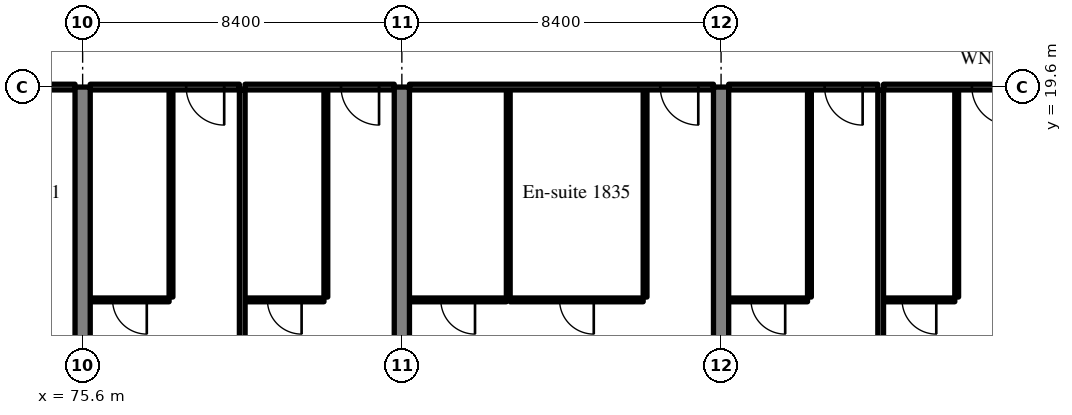
"""IFC4 building model, lengths in metres.
Left out: names, types, materials, properties, quantities, classifications, styles, units other than length and angle.
Written with IfcOpenShell. Run it as: python <this file> out.ifc"""

import sys

from ifc_helpers import new_model, si_unit, direction, frame, frame_2d, origin, place, context, subcontext, project, spatial, rectangle, extrude, source, transform, mapped, element, fill, save


model = new_model("IFC4")
c1 = context("Model", 3, precision=1e-05, world=origin(), true_north=direction((0.0, 1.0)))
c2 = subcontext(c1, "Body", "Model", "MODEL_VIEW")
j1 = project(units=[si_unit("LENGTHUNIT", "METRE"), si_unit("PLANEANGLEUNIT", "RADIAN")], contexts=[c1])
p1 = place(None, origin())
s1 = spatial("IfcSite", under=j1, at=p1, CompositionType="ELEMENT")
p2 = place(p1, origin())
s2 = spatial("IfcBuilding", under=s1, at=p2, CompositionType="ELEMENT")
p3 = place(p2, frame((0.0, 0.0, 77.2)))
s3 = spatial("IfcBuildingStorey", under=s2, at=p3, CompositionType="ELEMENT", Elevation=77.2)
m1 = source(origin(), c2, "Body", "SweptSolid", [
    extrude(rectangle(XDim=19.6, YDim=0.4, at=frame_2d((9.8, 0.0))), origin(), (0.0, 0.0, 1.0), 3.52),
])
for number, where, z_axis, x_axis in (
    (1, (75.6, 0.0, 0.0), (0.0, 0.0, 1.0), (0.0, 1.0, 0.0)),
    (2, (84.0, 0.0, 0.0), (0.0, 0.0, 1.0), (0.0, 1.0, 0.0)),
    (3, (92.4, 0.0, 0.0), (0.0, 0.0, 1.0), (0.0, 1.0, 0.0)),
):
    element("IfcWall", number, at=place(p3, frame(where, z_axis=z_axis, x_axis=x_axis)), inside=s3, PredefinedType="SHEAR", context=c2, shape_type="MappedRepresentation", body=[
        mapped(m1, transform((0.0, 0.0, 0.0), scale=1.0)),
    ])
m2 = source(origin(), c2, "Body", "SweptSolid", [
    extrude(rectangle(XDim=8.0, YDim=0.15, at=frame_2d((4.0, 0.0))), origin(), (0.0, 0.0, 1.0), 2.82),
])
p4 = place(p3, frame((67.4, 19.6, 0.0), z_axis=(0.0, 0.0, 1.0), x_axis=(1.0, 0.0, 0.0)))
e4 = element("IfcWall", 4, at=p4, inside=s3, PredefinedType="PARTITIONING", context=c2, shape_type="MappedRepresentation", body=[
    mapped(m2, transform((0.0, 0.0, 0.0), scale=1.0)),
])
m3 = source(origin(), c2, "Body", "SweptSolid", [
    extrude(rectangle(XDim=1.8, YDim=2.1, at=frame_2d((0.9, 1.05))), frame((0.0, 0.085, 0.0), z_axis=(0.0, -1.0, 0.0), x_axis=(1.0, 0.0, 0.0)), (0.0, 0.0, 1.0), 0.17),
])
p5 = place(p4, frame((3.1, 0.0, 0.0)))
e5 = element("IfcOpeningElement", 5, at=p5, cuts=e4, PredefinedType="OPENING", context=c2, shape_type="MappedRepresentation", body=[
    mapped(m3, transform((0.0, 0.0, 0.0), scale=1.0)),
])
m4 = source(origin(), c2, "Body", "SweptSolid", [
    extrude(rectangle(XDim=5.45, YDim=0.1, at=frame_2d((2.725, 0.0))), origin(), (0.0, 0.0, 1.0), 3.52),
])
p6 = place(p3, frame((77.925, 14.075, 0.0), z_axis=(0.0, 0.0, 1.0), x_axis=(0.0, 1.0, 0.0)))
e6 = element("IfcWall", 6, at=p6, inside=s3, PredefinedType="PARTITIONING", context=c2, shape_type="MappedRepresentation", body=[
    mapped(m4, transform((0.0, 0.0, 0.0), scale=1.0)),
])
m5 = source(origin(), c2, "Body", "SweptSolid", [
    extrude(rectangle(XDim=2.075, YDim=0.1, at=frame_2d((1.038, 0.0))), origin(), (0.0, 0.0, 1.0), 3.52),
])
p7 = place(p3, frame((75.8, 14.0, 0.0), z_axis=(0.0, 0.0, 1.0), x_axis=(1.0, 0.0, 0.0)))
e7 = element("IfcWall", 7, at=p7, inside=s3, PredefinedType="PARTITIONING", context=c2, shape_type="MappedRepresentation", body=[
    mapped(m5, transform((0.0, 0.0, 0.0), scale=1.0)),
])
m6 = source(origin(), c2, "Body", "SweptSolid", [
    extrude(rectangle(XDim=0.9, YDim=2.1, at=frame_2d((0.45, 1.05))), frame((0.0, 0.06, 0.0), z_axis=(0.0, -1.0, 0.0), x_axis=(1.0, 0.0, 0.0)), (0.0, 0.0, 1.0), 0.12),
])
p8 = place(p7, frame((0.588, 0.0, 0.0)))
e8 = element("IfcOpeningElement", 8, at=p8, cuts=e7, PredefinedType="OPENING", context=c2, shape_type="MappedRepresentation", body=[
    mapped(m6, transform((0.0, 0.0, 0.0), scale=1.0)),
])
m7 = source(origin(), c2, "Body", "SweptSolid", [
    extrude(rectangle(XDim=3.925, YDim=0.15, at=frame_2d((1.962, 0.0))), origin(), (0.0, 0.0, 1.0), 2.82),
])
p9 = place(p3, frame((75.8, 19.6, 0.0), z_axis=(0.0, 0.0, 1.0), x_axis=(1.0, 0.0, 0.0)))
e9 = element("IfcWall", 9, at=p9, inside=s3, PredefinedType="PARTITIONING", context=c2, shape_type="MappedRepresentation", body=[
    mapped(m7, transform((0.0, 0.0, 0.0), scale=1.0)),
])
m8 = source(origin(), c2, "Body", "SweptSolid", [
    extrude(rectangle(XDim=1.0, YDim=2.1, at=frame_2d((0.5, 1.05))), frame((0.0, 0.085, 0.0), z_axis=(0.0, -1.0, 0.0), x_axis=(1.0, 0.0, 0.0)), (0.0, 0.0, 1.0), 0.17),
])
p10 = place(p9, frame((2.525, 0.0, 0.0)))
e10 = element("IfcOpeningElement", 10, at=p10, cuts=e9, PredefinedType="OPENING", context=c2, shape_type="MappedRepresentation", body=[
    mapped(m8, transform((0.0, 0.0, 0.0), scale=1.0)),
])
p11 = place(p3, frame((82.0, 14.075, 0.0), z_axis=(0.0, 0.0, 1.0), x_axis=(0.0, 1.0, 0.0)))
e11 = element("IfcWall", 11, at=p11, inside=s3, PredefinedType="PARTITIONING", context=c2, shape_type="MappedRepresentation", body=[
    mapped(m4, transform((0.0, 0.0, 0.0), scale=1.0)),
])
p12 = place(p3, frame((79.875, 14.0, 0.0), z_axis=(0.0, 0.0, 1.0), x_axis=(1.0, 0.0, 0.0)))
e12 = element("IfcWall", 12, at=p12, inside=s3, PredefinedType="PARTITIONING", context=c2, shape_type="MappedRepresentation", body=[
    mapped(m5, transform((0.0, 0.0, 0.0), scale=1.0)),
])
p13 = place(p12, frame((0.587, 0.0, 0.0)))
e13 = element("IfcOpeningElement", 13, at=p13, cuts=e12, PredefinedType="OPENING", context=c2, shape_type="MappedRepresentation", body=[
    mapped(m6, transform((0.0, 0.0, 0.0), scale=1.0)),
])
p14 = place(p3, frame((79.875, 19.6, 0.0), z_axis=(0.0, 0.0, 1.0), x_axis=(1.0, 0.0, 0.0)))
e14 = element("IfcWall", 14, at=p14, inside=s3, PredefinedType="PARTITIONING", context=c2, shape_type="MappedRepresentation", body=[
    mapped(m7, transform((0.0, 0.0, 0.0), scale=1.0)),
])
p15 = place(p14, frame((2.525, 0.0, 0.0)))
e15 = element("IfcOpeningElement", 15, at=p15, cuts=e14, PredefinedType="OPENING", context=c2, shape_type="MappedRepresentation", body=[
    mapped(m8, transform((0.0, 0.0, 0.0), scale=1.0)),
])
m9 = source(origin(), c2, "Body", "SweptSolid", [
    extrude(rectangle(XDim=18.725, YDim=0.15, at=frame_2d((9.362, 0.0))), origin(), (0.0, 0.0, 1.0), 3.52),
])
p16 = place(p3, frame((79.8, 0.8, 0.0), z_axis=(0.0, 0.0, 1.0), x_axis=(0.0, 1.0, 0.0)))
e16 = element("IfcWall", 16, at=p16, inside=s3, PredefinedType="PARTITIONING", context=c2, shape_type="MappedRepresentation", body=[
    mapped(m9, transform((0.0, 0.0, 0.0), scale=1.0)),
])
for number, where, z_axis, x_axis in (
    (17, (90.4, 14.075, 0.0), (0.0, 0.0, 1.0), (0.0, 1.0, 0.0)),
    (18, (86.8, 14.075, 0.0), (0.0, 0.0, 1.0), (0.0, 1.0, 0.0)),
):
    element("IfcWall", number, at=place(p3, frame(where, z_axis=z_axis, x_axis=x_axis)), inside=s3, PredefinedType="PARTITIONING", context=c2, shape_type="MappedRepresentation", body=[
        mapped(m4, transform((0.0, 0.0, 0.0), scale=1.0)),
    ])
m10 = source(origin(), c2, "Body", "SweptSolid", [
    extrude(rectangle(XDim=3.5, YDim=0.1, at=frame_2d((1.75, 0.0))), origin(), (0.0, 0.0, 1.0), 3.52),
])
p17 = place(p3, frame((86.85, 14.0, 0.0), z_axis=(0.0, 0.0, 1.0), x_axis=(1.0, 0.0, 0.0)))
e19 = element("IfcWall", 19, at=p17, inside=s3, PredefinedType="PARTITIONING", context=c2, shape_type="MappedRepresentation", body=[
    mapped(m10, transform((0.0, 0.0, 0.0), scale=1.0)),
])
p18 = place(p17, frame((1.3, 0.0, 0.0)))
e20 = element("IfcOpeningElement", 20, at=p18, cuts=e19, PredefinedType="OPENING", context=c2, shape_type="MappedRepresentation", body=[
    mapped(m6, transform((0.0, 0.0, 0.0), scale=1.0)),
])
m11 = source(origin(), c2, "Body", "SweptSolid", [
    extrude(rectangle(XDim=2.55, YDim=0.1, at=frame_2d((1.275, 0.0))), origin(), (0.0, 0.0, 1.0), 3.52),
])
p19 = place(p3, frame((84.2, 14.0, 0.0), z_axis=(0.0, 0.0, 1.0), x_axis=(1.0, 0.0, 0.0)))
e21 = element("IfcWall", 21, at=p19, inside=s3, PredefinedType="PARTITIONING", context=c2, shape_type="MappedRepresentation", body=[
    mapped(m11, transform((0.0, 0.0, 0.0), scale=1.0)),
])
p20 = place(p19, frame((0.825, 0.0, 0.0)))
e22 = element("IfcOpeningElement", 22, at=p20, cuts=e21, PredefinedType="OPENING", context=c2, shape_type="MappedRepresentation", body=[
    mapped(m6, transform((0.0, 0.0, 0.0), scale=1.0)),
])
p21 = place(p3, frame((84.2, 19.6, 0.0), z_axis=(0.0, 0.0, 1.0), x_axis=(1.0, 0.0, 0.0)))
e23 = element("IfcWall", 23, at=p21, inside=s3, PredefinedType="PARTITIONING", context=c2, shape_type="MappedRepresentation", body=[
    mapped(m2, transform((0.0, 0.0, 0.0), scale=1.0)),
])
p22 = place(p21, frame((6.6, 0.0, 0.0)))
e24 = element("IfcOpeningElement", 24, at=p22, cuts=e23, PredefinedType="OPENING", context=c2, shape_type="MappedRepresentation", body=[
    mapped(m8, transform((0.0, 0.0, 0.0), scale=1.0)),
])
p23 = place(p3, frame((94.725, 14.075, 0.0), z_axis=(0.0, 0.0, 1.0), x_axis=(0.0, 1.0, 0.0)))
e25 = element("IfcWall", 25, at=p23, inside=s3, PredefinedType="PARTITIONING", context=c2, shape_type="MappedRepresentation", body=[
    mapped(m4, transform((0.0, 0.0, 0.0), scale=1.0)),
])
p24 = place(p3, frame((92.6, 14.0, 0.0), z_axis=(0.0, 0.0, 1.0), x_axis=(1.0, 0.0, 0.0)))
e26 = element("IfcWall", 26, at=p24, inside=s3, PredefinedType="PARTITIONING", context=c2, shape_type="MappedRepresentation", body=[
    mapped(m5, transform((0.0, 0.0, 0.0), scale=1.0)),
])
p25 = place(p24, frame((0.587, 0.0, 0.0)))
e27 = element("IfcOpeningElement", 27, at=p25, cuts=e26, PredefinedType="OPENING", context=c2, shape_type="MappedRepresentation", body=[
    mapped(m6, transform((0.0, 0.0, 0.0), scale=1.0)),
])
m12 = source(origin(), c2, "Body", "SweptSolid", [
    extrude(rectangle(XDim=3.925, YDim=0.15, at=frame_2d((1.962, 0.0))), origin(), (0.0, 0.0, 1.0), 2.82),
])
p26 = place(p3, frame((92.6, 19.6, 0.0), z_axis=(0.0, 0.0, 1.0), x_axis=(1.0, 0.0, 0.0)))
e28 = element("IfcWall", 28, at=p26, inside=s3, PredefinedType="PARTITIONING", context=c2, shape_type="MappedRepresentation", body=[
    mapped(m12, transform((0.0, 0.0, 0.0), scale=1.0)),
])
p27 = place(p26, frame((2.525, 0.0, 0.0)))
e29 = element("IfcOpeningElement", 29, at=p27, cuts=e28, PredefinedType="OPENING", context=c2, shape_type="MappedRepresentation", body=[
    mapped(m8, transform((0.0, 0.0, 0.0), scale=1.0)),
])
p28 = place(p3, frame((98.6, 14.075, 0.0), z_axis=(0.0, 0.0, 1.0), x_axis=(0.0, 1.0, 0.0)))
e30 = element("IfcWall", 30, at=p28, inside=s3, PredefinedType="PARTITIONING", context=c2, shape_type="MappedRepresentation", body=[
    mapped(m4, transform((0.0, 0.0, 0.0), scale=1.0)),
])
m13 = source(origin(), c2, "Body", "SweptSolid", [
    extrude(rectangle(XDim=1.875, YDim=0.1, at=frame_2d((0.938, 0.0))), origin(), (0.0, 0.0, 1.0), 3.52),
])
p29 = place(p3, frame((96.675, 14.0, 0.0), z_axis=(0.0, 0.0, 1.0), x_axis=(1.0, 0.0, 0.0)))
e31 = element("IfcWall", 31, at=p29, inside=s3, PredefinedType="PARTITIONING", context=c2, shape_type="MappedRepresentation", body=[
    mapped(m13, transform((0.0, 0.0, 0.0), scale=1.0)),
])
p30 = place(p29, frame((0.488, 0.0, 0.0)))
e32 = element("IfcOpeningElement", 32, at=p30, cuts=e31, PredefinedType="OPENING", context=c2, shape_type="MappedRepresentation", body=[
    mapped(m6, transform((0.0, 0.0, 0.0), scale=1.0)),
])
m14 = source(origin(), c2, "Body", "SweptSolid", [
    extrude(rectangle(XDim=3.725, YDim=0.15, at=frame_2d((1.862, 0.0))), origin(), (0.0, 0.0, 1.0), 2.82),
])
p31 = place(p3, frame((96.675, 19.6, 0.0), z_axis=(0.0, 0.0, 1.0), x_axis=(1.0, 0.0, 0.0)))
e33 = element("IfcWall", 33, at=p31, inside=s3, PredefinedType="PARTITIONING", context=c2, shape_type="MappedRepresentation", body=[
    mapped(m14, transform((0.0, 0.0, 0.0), scale=1.0)),
])
p32 = place(p31, frame((2.325, 0.0, 0.0)))
e34 = element("IfcOpeningElement", 34, at=p32, cuts=e33, PredefinedType="OPENING", context=c2, shape_type="MappedRepresentation", body=[
    mapped(m8, transform((0.0, 0.0, 0.0), scale=1.0)),
])
m15 = source(origin(), c2, "Body", "SweptSolid", [
    extrude(rectangle(XDim=18.947, YDim=0.15, at=frame_2d((9.474, 0.0))), origin(), (0.0, 0.0, 1.0), 3.52),
])
p33 = place(p3, frame((96.6, 0.578, 0.0), z_axis=(0.0, 0.0, 1.0), x_axis=(0.0, 1.0, 0.0)))
e35 = element("IfcWall", 35, at=p33, inside=s3, PredefinedType="PARTITIONING", context=c2, shape_type="MappedRepresentation", body=[
    mapped(m15, transform((0.0, 0.0, 0.0), scale=1.0)),
])
m16 = source(origin(), c2, "Body", "SweptSolid", [
    extrude(rectangle(XDim=0.9, YDim=2.1, at=frame_2d((0.45, 1.05))), frame((0.0, 0.025, 0.0), z_axis=(0.0, -1.0, 0.0), x_axis=(1.0, 0.0, 0.0)), (0.0, 0.0, 1.0), 0.05),
])
p34 = place(p8, origin())
e36 = element("IfcDoor", 36, at=p34, inside=s3, OperationType="SINGLE_SWING_RIGHT", PredefinedType="DOOR", context=c2, shape_type="MappedRepresentation", body=[
    mapped(m16, transform((0.0, 0.0, 0.0), scale=1.0)),
])
fill(e8, e36)
m17 = source(origin(), c2, "Body", "SweptSolid", [
    extrude(rectangle(XDim=1.0, YDim=2.1, at=frame_2d((0.5, 1.05))), frame((0.0, 0.025, 0.0), z_axis=(0.0, -1.0, 0.0), x_axis=(1.0, 0.0, 0.0)), (0.0, 0.0, 1.0), 0.05),
])
p35 = place(p10, origin())
e37 = element("IfcDoor", 37, at=p35, inside=s3, OperationType="SINGLE_SWING_RIGHT", PredefinedType="DOOR", context=c2, shape_type="MappedRepresentation", body=[
    mapped(m17, transform((0.0, 0.0, 0.0), scale=1.0)),
])
fill(e10, e37)
p36 = place(p13, origin())
e38 = element("IfcDoor", 38, at=p36, inside=s3, OperationType="SINGLE_SWING_RIGHT", PredefinedType="DOOR", context=c2, shape_type="MappedRepresentation", body=[
    mapped(m16, transform((0.0, 0.0, 0.0), scale=1.0)),
])
fill(e13, e38)
p37 = place(p15, origin())
e39 = element("IfcDoor", 39, at=p37, inside=s3, OperationType="SINGLE_SWING_RIGHT", PredefinedType="DOOR", context=c2, shape_type="MappedRepresentation", body=[
    mapped(m17, transform((0.0, 0.0, 0.0), scale=1.0)),
])
fill(e15, e39)
p38 = place(p18, origin())
e40 = element("IfcDoor", 40, at=p38, inside=s3, OperationType="SINGLE_SWING_RIGHT", PredefinedType="DOOR", context=c2, shape_type="MappedRepresentation", body=[
    mapped(m16, transform((0.0, 0.0, 0.0), scale=1.0)),
])
fill(e20, e40)
p39 = place(p20, origin())
e41 = element("IfcDoor", 41, at=p39, inside=s3, OperationType="SINGLE_SWING_RIGHT", PredefinedType="DOOR", context=c2, shape_type="MappedRepresentation", body=[
    mapped(m16, transform((0.0, 0.0, 0.0), scale=1.0)),
])
fill(e22, e41)
p40 = place(p22, origin())
e42 = element("IfcDoor", 42, at=p40, inside=s3, OperationType="SINGLE_SWING_RIGHT", PredefinedType="DOOR", context=c2, shape_type="MappedRepresentation", body=[
    mapped(m17, transform((0.0, 0.0, 0.0), scale=1.0)),
])
fill(e24, e42)
p41 = place(p25, origin())
e43 = element("IfcDoor", 43, at=p41, inside=s3, OperationType="SINGLE_SWING_RIGHT", PredefinedType="DOOR", context=c2, shape_type="MappedRepresentation", body=[
    mapped(m16, transform((0.0, 0.0, 0.0), scale=1.0)),
])
fill(e27, e43)
p42 = place(p27, origin())
e44 = element("IfcDoor", 44, at=p42, inside=s3, OperationType="SINGLE_SWING_RIGHT", PredefinedType="DOOR", context=c2, shape_type="MappedRepresentation", body=[
    mapped(m17, transform((0.0, 0.0, 0.0), scale=1.0)),
])
fill(e29, e44)
p43 = place(p30, origin())
e45 = element("IfcDoor", 45, at=p43, inside=s3, OperationType="SINGLE_SWING_RIGHT", PredefinedType="DOOR", context=c2, shape_type="MappedRepresentation", body=[
    mapped(m16, transform((0.0, 0.0, 0.0), scale=1.0)),
])
fill(e32, e45)
p44 = place(p32, origin())
e46 = element("IfcDoor", 46, at=p44, inside=s3, OperationType="SINGLE_SWING_RIGHT", PredefinedType="DOOR", context=c2, shape_type="MappedRepresentation", body=[
    mapped(m17, transform((0.0, 0.0, 0.0), scale=1.0)),
])
fill(e34, e46)
save(model, sys.argv[1])
